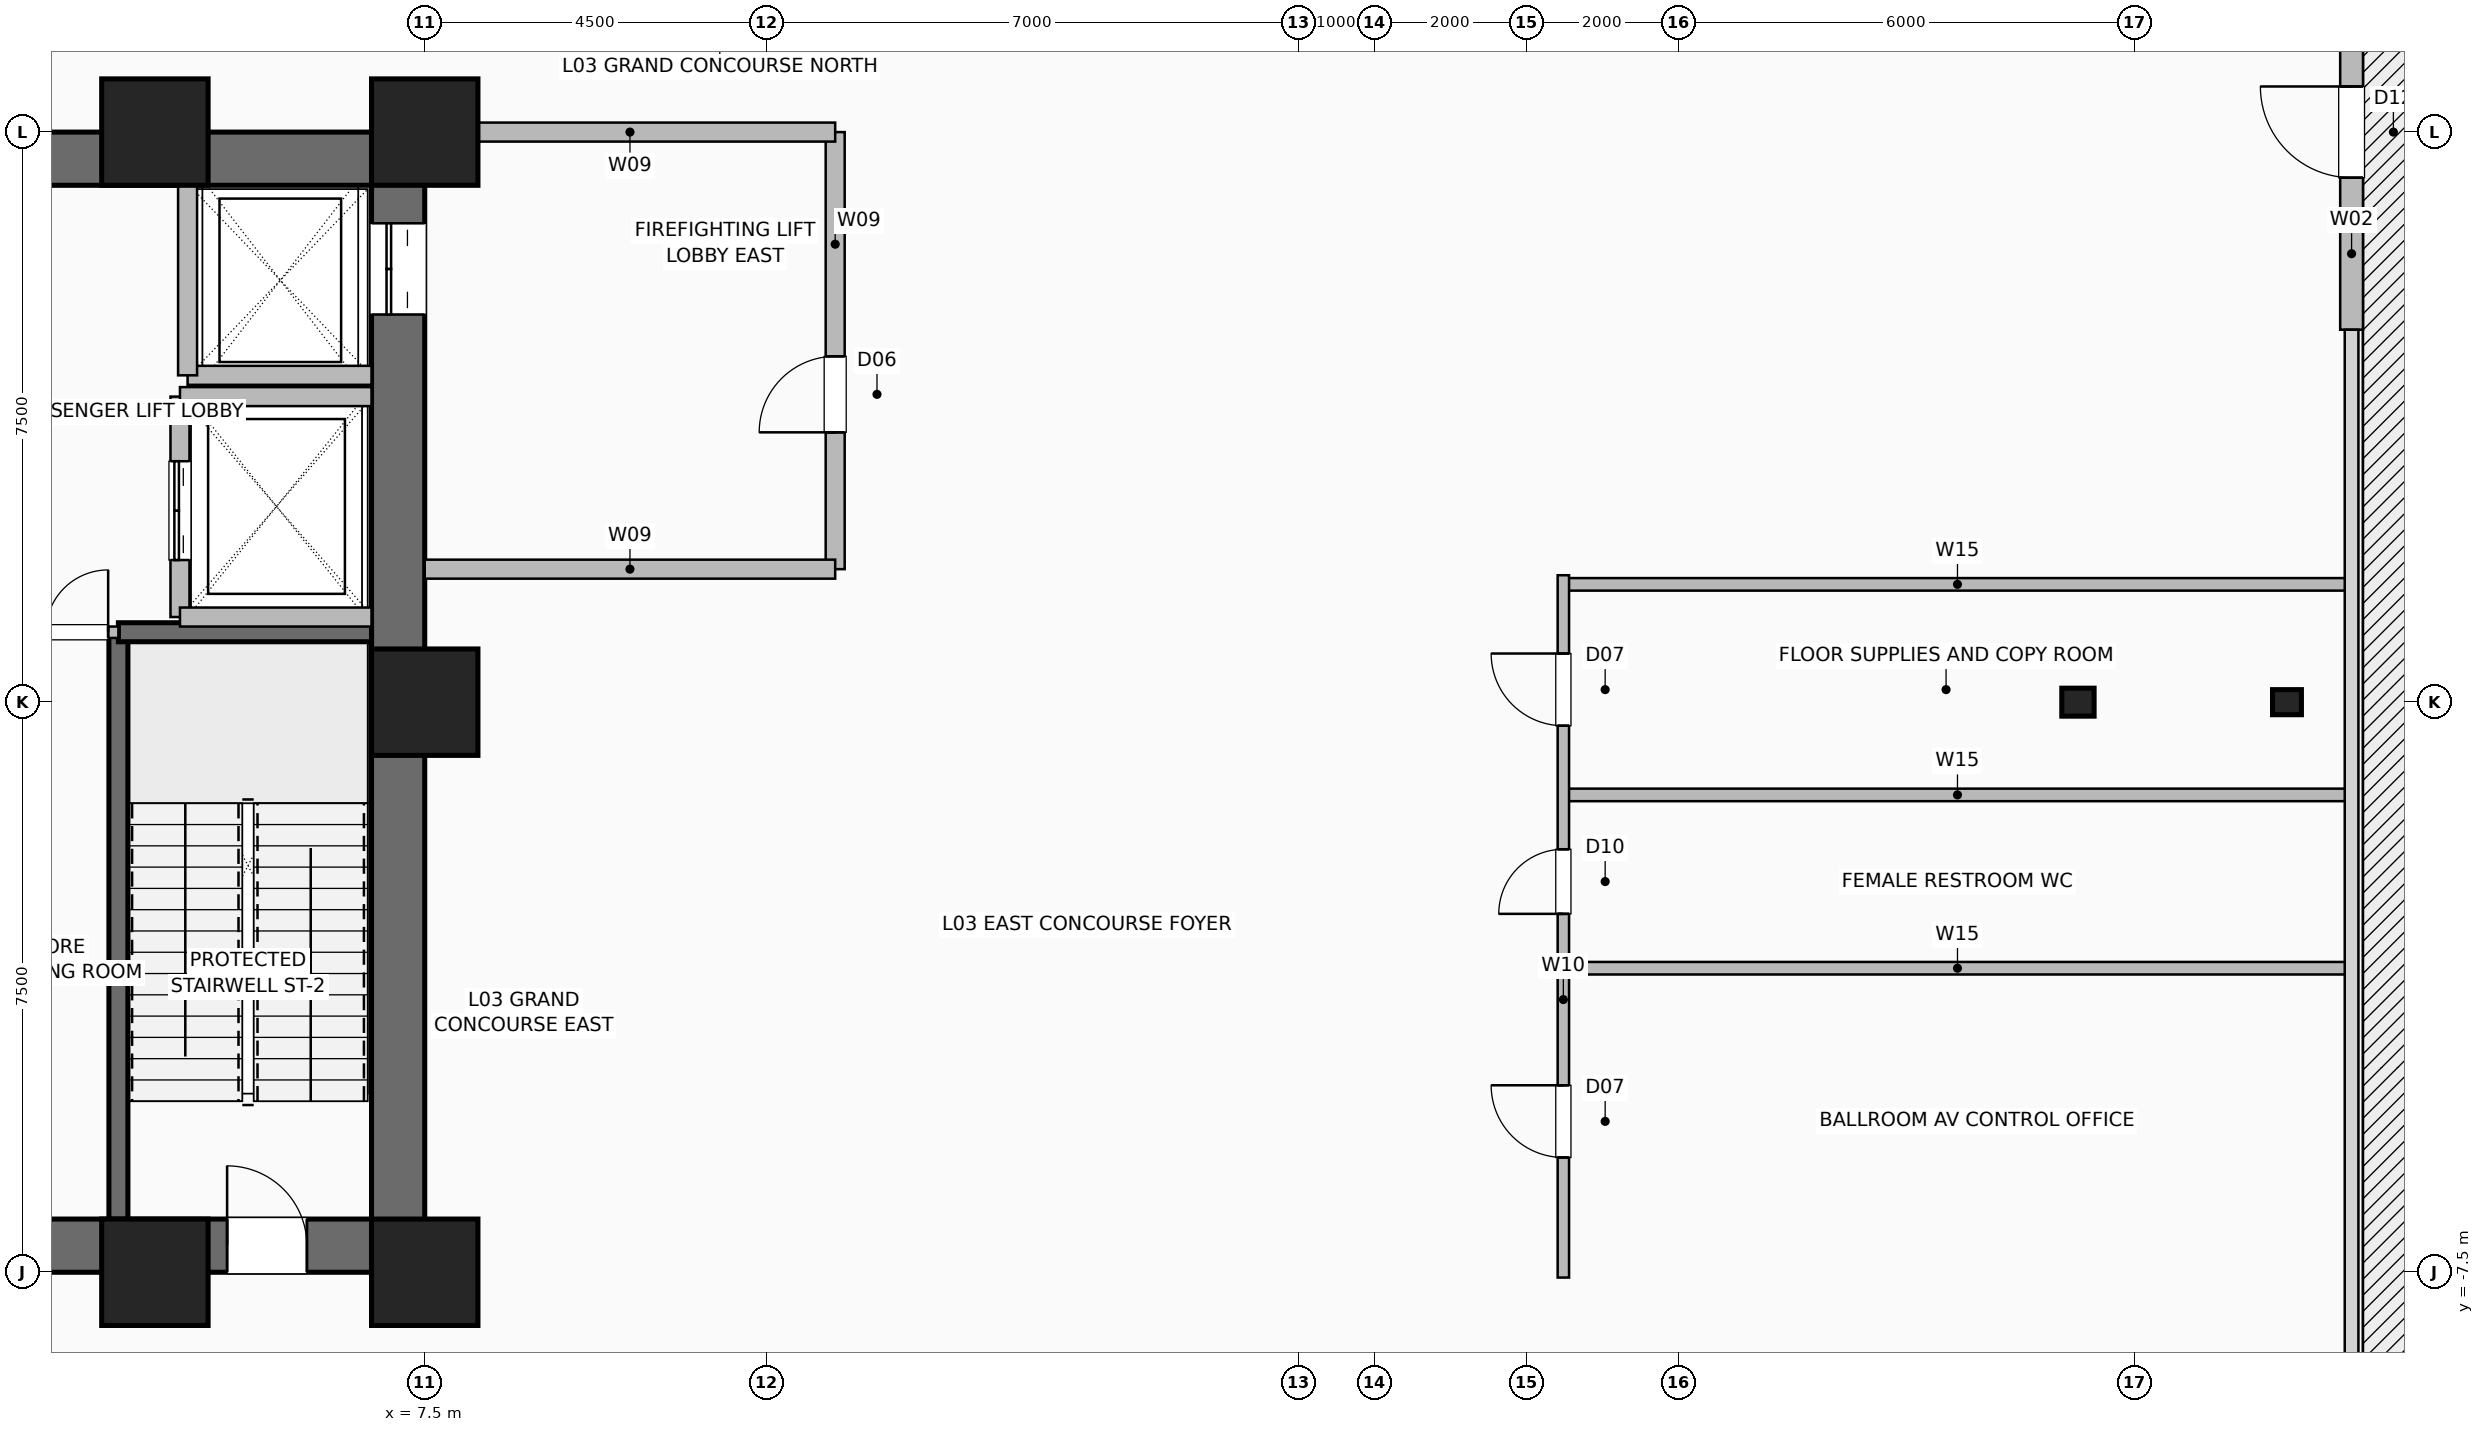
"""IFC4 building model, lengths in metres.
Left out: names, types, materials, properties, quantities, classifications, styles, units other than length and angle.
Written with IfcOpenShell. Run it as: python <this file> out.ifc"""

import sys

from ifc_helpers import new_model, si_unit, direction, frame, frame_2d, origin, origin_2d, place, context, subcontext, project, spatial, rectangle, hollow_rectangle, i_section, extrude, element, fill, save


model = new_model("IFC4")
c1 = context("Model", 3, precision=1e-05, world=origin(), true_north=direction((0.0, 1.0)))
c2 = subcontext(c1, "Body", "Model", "MODEL_VIEW")
j1 = project(units=[si_unit("LENGTHUNIT", "METRE"), si_unit("PLANEANGLEUNIT", "RADIAN")], contexts=[c1])
p1 = place(None, origin())
s1 = spatial("IfcSite", under=j1, at=p1, CompositionType="ELEMENT")
p2 = place(p1, origin())
s2 = spatial("IfcBuilding", under=s1, at=p2, CompositionType="ELEMENT")
p3 = place(p2, frame((0.0, 0.0, 16.2)))
s3 = spatial("IfcBuildingStorey", under=s2, at=p3, CompositionType="ELEMENT", Elevation=16.2)
for number, where, z_axis, x_axis in (
    (1, (3.95, -7.5, 0.0), (0.0, 0.0, 1.0), (1.0, 0.0, 0.0)),
    (2, (7.5, -7.5, 0.0), (0.0, 0.0, 1.0), (1.0, 0.0, 0.0)),
    (3, (7.5, 0.0, 0.0), (0.0, 0.0, 1.0), (1.0, 0.0, 0.0)),
    (4, (7.5, 7.5, 0.0), (0.0, 0.0, 1.0), (1.0, 0.0, 0.0)),
    (5, (3.95, 7.5, 0.0), (0.0, 0.0, 1.0), (1.0, 0.0, 0.0)),
):
    element("IfcColumn", number, at=place(p3, frame(where, z_axis=z_axis, x_axis=x_axis)), inside=s3, PredefinedType="COLUMN", context=c2, shape_type="SweptSolid", body=[
        extrude(hollow_rectangle(XDim=1.4, YDim=1.4, WallThickness=0.06, at=origin_2d()), origin(), (0.0, 0.0, 1.0), 5.4),
    ])
p4 = place(p3, frame((29.25, 0.0, 0.0), z_axis=(0.0, 0.0, 1.0), x_axis=(1.0, 0.0, 0.0)))
e6 = element("IfcColumn", 6, at=p4, inside=s3, PredefinedType="COLUMN", context=c2, shape_type="SweptSolid", body=[
    extrude(i_section(OverallWidth=0.368, OverallDepth=0.425, WebThickness=0.03, FlangeThickness=0.048, FilletRadius=0.02, at=origin_2d()), origin(), (0.0, 0.0, 1.0), 5.4),
])
p5 = place(p3, frame((32.0, 0.0, -0.4), z_axis=(0.0, 0.0, 1.0), x_axis=(1.0, 0.0, 0.0)))
e7 = element("IfcColumn", 7, at=p5, inside=s3, PredefinedType="COLUMN", context=c2, shape_type="SweptSolid", body=[
    extrude(i_section(OverallWidth=0.33, OverallDepth=0.38, WebThickness=0.017, FlangeThickness=0.028, FilletRadius=0.02, at=origin_2d()), origin(), (0.0, 0.0, 1.0), 5.4),
])
p6 = place(p3, frame((32.85, 4.9, 0.0), z_axis=(0.0, 0.0, 1.0), x_axis=(0.0, 1.0, 0.0)))
e8 = element("IfcWall", 8, at=p6, inside=s3, PredefinedType="SOLIDWALL", context=c2, shape_type="SweptSolid", body=[
    extrude(rectangle(XDim=5.2, YDim=0.3, at=frame_2d((2.6, 0.0))), origin(), (0.0, 0.0, 1.0), 5.0),
])
p7 = place(p6, frame((2.0, 0.0, 0.0)))
e9 = element("IfcOpeningElement", 9, at=p7, cuts=e8, PredefinedType="OPENING", context=c2, shape_type="SweptSolid", body=[
    extrude(rectangle(XDim=1.2, YDim=2.25, at=frame_2d((0.6, 1.125))), frame((0.0, 0.16, 0.0), z_axis=(0.0, -1.0, 0.0), x_axis=(1.0, 0.0, 0.0)), (0.0, 0.0, 1.0), 0.32),
])
p8 = place(p3, frame((-7.5, -7.15, 0.0), z_axis=(0.0, 0.0, 1.0), x_axis=(1.0, 0.0, 0.0)))
e10 = element("IfcWall", 10, at=p8, inside=s3, PredefinedType="SHEAR", context=c2, shape_type="SweptSolid", body=[
    extrude(rectangle(XDim=15.0, YDim=0.7, at=frame_2d((7.5, 0.0))), origin(), (0.0, 0.0, 1.0), 5.0),
])
p9 = place(p8, frame((1.55, 0.0, 0.0)))
e11 = element("IfcOpeningElement", 11, at=p9, cuts=e10, PredefinedType="OPENING", context=c2, shape_type="SweptSolid", body=[
    extrude(rectangle(XDim=1.05, YDim=2.08, at=frame_2d((0.525, 1.04))), frame((0.0, 0.36, 0.0), z_axis=(0.0, -1.0, 0.0), x_axis=(1.0, 0.0, 0.0)), (0.0, 0.0, 1.0), 0.72),
])
p10 = place(p8, frame((12.4, 0.0, 0.0)))
e12 = element("IfcOpeningElement", 12, at=p10, cuts=e10, PredefinedType="OPENING", context=c2, shape_type="SweptSolid", body=[
    extrude(rectangle(XDim=1.05, YDim=2.08, at=frame_2d((0.525, 1.04))), frame((0.0, 0.36, 0.0), z_axis=(0.0, -1.0, 0.0), x_axis=(1.0, 0.0, 0.0)), (0.0, 0.0, 1.0), 0.72),
])
p11 = place(p8, frame((4.64, 0.0, 0.0)))
e13 = element("IfcOpeningElement", 13, at=p11, cuts=e10, PredefinedType="OPENING", context=c2, shape_type="SweptSolid", body=[
    extrude(rectangle(XDim=1.1, YDim=2.2, at=frame_2d((0.55, 1.1))), frame((0.0, 0.36, 0.0), z_axis=(0.0, -1.0, 0.0), x_axis=(1.0, 0.0, 0.0)), (0.0, 0.0, 1.0), 0.72),
])
p12 = place(p8, frame((6.52, 0.0, 0.0)))
e14 = element("IfcOpeningElement", 14, at=p12, cuts=e10, PredefinedType="OPENING", context=c2, shape_type="SweptSolid", body=[
    extrude(rectangle(XDim=1.1, YDim=2.2, at=frame_2d((0.55, 1.1))), frame((0.0, 0.36, 0.0), z_axis=(0.0, -1.0, 0.0), x_axis=(1.0, 0.0, 0.0)), (0.0, 0.0, 1.0), 0.72),
])
p13 = place(p8, frame((8.4, 0.0, 0.0)))
e15 = element("IfcOpeningElement", 15, at=p13, cuts=e10, PredefinedType="OPENING", context=c2, shape_type="SweptSolid", body=[
    extrude(rectangle(XDim=1.1, YDim=2.2, at=frame_2d((0.55, 1.1))), frame((0.0, 0.36, 0.0), z_axis=(0.0, -1.0, 0.0), x_axis=(1.0, 0.0, 0.0)), (0.0, 0.0, 1.0), 0.72),
])
p14 = place(p3, frame((-7.5, 7.15, 0.0), z_axis=(0.0, 0.0, 1.0), x_axis=(1.0, 0.0, 0.0)))
e16 = element("IfcWall", 16, at=p14, inside=s3, PredefinedType="SHEAR", context=c2, shape_type="SweptSolid", body=[
    extrude(rectangle(XDim=15.0, YDim=0.7, at=frame_2d((7.5, 0.0))), origin(), (0.0, 0.0, 1.0), 5.0),
])
p15 = place(p3, frame((7.15, -7.5, 0.0), z_axis=(0.0, 0.0, 1.0), x_axis=(0.0, 1.0, 0.0)))
e17 = element("IfcWall", 17, at=p15, inside=s3, PredefinedType="SHEAR", context=c2, shape_type="SweptSolid", body=[
    extrude(rectangle(XDim=15.0, YDim=0.7, at=frame_2d((7.5, 0.0))), origin(), (0.0, 0.0, 1.0), 5.0),
])
p16 = place(p15, frame((12.6, 0.0, 0.0)))
e18 = element("IfcOpeningElement", 18, at=p16, cuts=e17, PredefinedType="OPENING", context=c2, shape_type="SweptSolid", body=[
    extrude(rectangle(XDim=1.2, YDim=2.2, at=frame_2d((0.6, 1.1))), frame((0.0, 0.36, 0.0), z_axis=(0.0, -1.0, 0.0), x_axis=(1.0, 0.0, 0.0)), (0.0, 0.0, 1.0), 0.72),
])
p17 = place(p3, frame((3.47, -6.8, 0.0), z_axis=(0.0, 0.0, 1.0), x_axis=(0.0, 1.0, 0.0)))
e19 = element("IfcWall", 19, at=p17, inside=s3, PredefinedType="SHEAR", context=c2, shape_type="SweptSolid", body=[
    extrude(rectangle(XDim=7.72, YDim=0.25, at=frame_2d((3.86, 0.0))), origin(), (0.0, 0.0, 1.0), 5.0),
])
p18 = place(p3, frame((3.47, 0.92, 0.0), z_axis=(0.0, 0.0, 1.0), x_axis=(1.0, 0.0, 0.0)))
e20 = element("IfcWall", 20, at=p18, inside=s3, PredefinedType="SHEAR", context=c2, shape_type="SweptSolid", body=[
    extrude(rectangle(XDim=3.33, YDim=0.25, at=frame_2d((1.665, 0.0))), origin(), (0.0, 0.0, 1.0), 5.0),
])
p19 = place(p3, frame((4.38, 4.3, 0.0), z_axis=(0.0, 0.0, 1.0), x_axis=(1.0, 0.0, 0.0)))
e21 = element("IfcWall", 21, at=p19, inside=s3, PredefinedType="SHEAR", context=c2, shape_type="SweptSolid", body=[
    extrude(rectangle(XDim=2.42, YDim=0.25, at=frame_2d((1.21, 0.0))), origin(), (0.0, 0.0, 1.0), 5.0),
])
p20 = place(p3, frame((4.38, 4.3, 0.0), z_axis=(0.0, 0.0, 1.0), x_axis=(0.0, 1.0, 0.0)))
e22 = element("IfcWall", 22, at=p20, inside=s3, PredefinedType="SHEAR", context=c2, shape_type="SweptSolid", body=[
    extrude(rectangle(XDim=2.5, YDim=0.25, at=frame_2d((1.25, 0.0))), origin(), (0.0, 0.0, 1.0), 5.0),
])
p21 = place(p3, frame((4.28, 1.12, 0.0), z_axis=(0.0, 0.0, 1.0), x_axis=(0.0, 1.0, 0.0)))
e23 = element("IfcWall", 23, at=p21, inside=s3, PredefinedType="SHEAR", context=c2, shape_type="SweptSolid", body=[
    extrude(rectangle(XDim=2.9, YDim=0.25, at=frame_2d((1.45, 0.0))), origin(), (0.0, 0.0, 1.0), 5.0),
])
p22 = place(p21, frame((0.75, 0.0, 0.0)))
e24 = element("IfcOpeningElement", 24, at=p22, cuts=e23, PredefinedType="OPENING", context=c2, shape_type="SweptSolid", body=[
    extrude(rectangle(XDim=1.3, YDim=2.3, at=frame_2d((0.65, 1.15))), frame((0.0, 0.135, 0.0), z_axis=(0.0, -1.0, 0.0), x_axis=(1.0, 0.0, 0.0)), (0.0, 0.0, 1.0), 0.27),
])
for number, where, z_axis, x_axis in (
    (25, (4.28, 1.12, 0.0), (0.0, 0.0, 1.0), (1.0, 0.0, 0.0)),
    (26, (4.28, 4.02, 0.0), (0.0, 0.0, 1.0), (1.0, 0.0, 0.0)),
):
    element("IfcWall", number, at=place(p3, frame(where, z_axis=z_axis, x_axis=x_axis)), inside=s3, PredefinedType="SHEAR", context=c2, shape_type="SweptSolid", body=[
        extrude(rectangle(XDim=2.52, YDim=0.25, at=frame_2d((1.26, 0.0))), origin(), (0.0, 0.0, 1.0), 5.0),
    ])
p23 = place(p3, frame((2.38, 0.92, 0.0), z_axis=(0.0, 0.0, 1.0), x_axis=(1.0, 0.0, 0.0)))
e27 = element("IfcWall", 27, at=p23, inside=s3, PredefinedType="PARTITIONING", context=c2, shape_type="SweptSolid", body=[
    extrude(rectangle(XDim=1.09, YDim=0.15, at=frame_2d((0.545, 0.0))), origin(), (0.0, 0.0, 1.0), 5.0),
])
p24 = place(p23, frame((0.135, 0.0, 0.0)))
e28 = element("IfcOpeningElement", 28, at=p24, cuts=e27, PredefinedType="OPENING", context=c2, shape_type="SweptSolid", body=[
    extrude(rectangle(XDim=0.82, YDim=2.05, at=frame_2d((0.41, 1.025))), frame((0.0, 0.085, 0.0), z_axis=(0.0, -1.0, 0.0), x_axis=(1.0, 0.0, 0.0)), (0.0, 0.0, 1.0), 0.17),
])
p25 = place(p3, frame((12.9, 1.75, 0.0), z_axis=(0.0, 0.0, 1.0), x_axis=(0.0, 1.0, 0.0)))
e29 = element("IfcWall", 29, at=p25, inside=s3, PredefinedType="SHEAR", context=c2, shape_type="SweptSolid", body=[
    extrude(rectangle(XDim=5.75, YDim=0.25, at=frame_2d((2.875, 0.0))), origin(), (0.0, 0.0, 1.0), 5.0),
])
p26 = place(p25, frame((1.8, 0.0, 0.0)))
e30 = element("IfcOpeningElement", 30, at=p26, cuts=e29, PredefinedType="OPENING", context=c2, shape_type="SweptSolid", body=[
    extrude(rectangle(XDim=1.0, YDim=2.08, at=frame_2d((0.5, 1.04))), frame((0.0, 0.135, 0.0), z_axis=(0.0, -1.0, 0.0), x_axis=(1.0, 0.0, 0.0)), (0.0, 0.0, 1.0), 0.27),
])
for number, where, z_axis, x_axis in (
    (31, (7.5, 1.75, 0.0), (0.0, 0.0, 1.0), (1.0, 0.0, 0.0)),
    (32, (7.5, 7.5, 0.0), (0.0, 0.0, 1.0), (1.0, 0.0, 0.0)),
):
    element("IfcWall", number, at=place(p3, frame(where, z_axis=z_axis, x_axis=x_axis)), inside=s3, PredefinedType="SHEAR", context=c2, shape_type="SweptSolid", body=[
        extrude(rectangle(XDim=5.4, YDim=0.25, at=frame_2d((2.7, 0.0))), origin(), (0.0, 0.0, 1.0), 5.0),
    ])
for number, where, z_axis, x_axis in (
    (33, (22.48, -1.22, 0.0), (0.0, 0.0, 1.0), (1.0, 0.0, 0.0)),
    (34, (22.48, -3.5, 0.0), (0.0, 0.0, 1.0), (1.0, 0.0, 0.0)),
    (35, (22.48, 1.55, 0.0), (0.0, 0.0, 1.0), (1.0, 0.0, 0.0)),
):
    element("IfcWall", number, at=place(p3, frame(where, z_axis=z_axis, x_axis=x_axis)), inside=s3, PredefinedType="PLUMBINGWALL", context=c2, shape_type="SweptSolid", body=[
        extrude(rectangle(XDim=10.37, YDim=0.165, at=frame_2d((5.185, 0.0))), origin(), (0.0, 0.0, 1.0), 5.0),
    ])
p27 = place(p3, frame((22.48, -7.57, 0.0), z_axis=(0.0, 0.0, 1.0), x_axis=(0.0, 1.0, 0.0)))
e36 = element("IfcWall", 36, at=p27, inside=s3, PredefinedType="PARTITIONING", context=c2, shape_type="SweptSolid", body=[
    extrude(rectangle(XDim=9.24, YDim=0.15, at=frame_2d((4.62, 0.0))), origin(), (0.0, 0.0, 1.0), 5.0),
])
p28 = place(p27, frame((1.58, 0.0, 0.0)))
e37 = element("IfcOpeningElement", 37, at=p28, cuts=e36, PredefinedType="OPENING", context=c2, shape_type="SweptSolid", body=[
    extrude(rectangle(XDim=0.95, YDim=2.06, at=frame_2d((0.475, 1.03))), frame((0.0, 0.085, 0.0), z_axis=(0.0, -1.0, 0.0), x_axis=(1.0, 0.0, 0.0)), (0.0, 0.0, 1.0), 0.17),
])
p29 = place(p27, frame((4.785, 0.0, 0.0)))
e38 = element("IfcOpeningElement", 38, at=p29, cuts=e36, PredefinedType="OPENING", context=c2, shape_type="SweptSolid", body=[
    extrude(rectangle(XDim=0.85, YDim=2.05, at=frame_2d((0.425, 1.025))), frame((0.0, 0.085, 0.0), z_axis=(0.0, -1.0, 0.0), x_axis=(1.0, 0.0, 0.0)), (0.0, 0.0, 1.0), 0.17),
])
p30 = place(p27, frame((7.26, 0.0, 0.0)))
e39 = element("IfcOpeningElement", 39, at=p30, cuts=e36, PredefinedType="OPENING", context=c2, shape_type="SweptSolid", body=[
    extrude(rectangle(XDim=0.95, YDim=2.06, at=frame_2d((0.475, 1.03))), frame((0.0, 0.085, 0.0), z_axis=(0.0, -1.0, 0.0), x_axis=(1.0, 0.0, 0.0)), (0.0, 0.0, 1.0), 0.17),
])
p31 = place(p7, origin())
e40 = element("IfcDoor", 40, at=p31, inside=s3, OperationType="SINGLE_SWING_RIGHT", PredefinedType="DOOR", context=c2, shape_type="SweptSolid", body=[
    extrude(rectangle(XDim=1.2, YDim=2.25, at=frame_2d((0.6, 1.125))), frame((0.0, 0.025, 0.0), z_axis=(0.0, -1.0, 0.0), x_axis=(1.0, 0.0, 0.0)), (0.0, 0.0, 1.0), 0.05),
])
fill(e9, e40)
p32 = place(p10, origin())
e41 = element("IfcDoor", 41, at=p32, inside=s3, OperationType="SINGLE_SWING_LEFT", PredefinedType="DOOR", context=c2, shape_type="SweptSolid", body=[
    extrude(rectangle(XDim=1.05, YDim=2.08, at=frame_2d((0.525, 1.04))), frame((0.0, 0.025, 0.0), z_axis=(0.0, -1.0, 0.0), x_axis=(1.0, 0.0, 0.0)), (0.0, 0.0, 1.0), 0.05),
])
fill(e12, e41)
p33 = place(p16, origin())
e42 = element("IfcDoor", 42, at=p33, inside=s3, OperationType="DOUBLE_DOOR_SLIDING", PredefinedType="DOOR", context=c2, shape_type="SweptSolid", body=[
    extrude(rectangle(XDim=1.2, YDim=2.2, at=frame_2d((0.6, 1.1))), frame((0.0, 0.025, 0.0), z_axis=(0.0, -1.0, 0.0), x_axis=(1.0, 0.0, 0.0)), (0.0, 0.0, 1.0), 0.05),
])
fill(e18, e42)
p34 = place(p22, origin())
e43 = element("IfcDoor", 43, at=p34, inside=s3, OperationType="DOUBLE_DOOR_SLIDING", PredefinedType="DOOR", context=c2, shape_type="SweptSolid", body=[
    extrude(rectangle(XDim=1.3, YDim=2.3, at=frame_2d((0.65, 1.15))), frame((0.0, 0.025, 0.0), z_axis=(0.0, -1.0, 0.0), x_axis=(1.0, 0.0, 0.0)), (0.0, 0.0, 1.0), 0.05),
])
fill(e24, e43)
p35 = place(p24, origin())
e44 = element("IfcDoor", 44, at=p35, inside=s3, OperationType="SINGLE_SWING_RIGHT", PredefinedType="DOOR", context=c2, shape_type="SweptSolid", body=[
    extrude(rectangle(XDim=0.82, YDim=2.05, at=frame_2d((0.41, 1.025))), frame((0.0, 0.025, 0.0), z_axis=(0.0, -1.0, 0.0), x_axis=(1.0, 0.0, 0.0)), (0.0, 0.0, 1.0), 0.05),
])
fill(e28, e44)
p36 = place(p26, origin())
e45 = element("IfcDoor", 45, at=p36, inside=s3, OperationType="SINGLE_SWING_LEFT", PredefinedType="DOOR", context=c2, shape_type="SweptSolid", body=[
    extrude(rectangle(XDim=1.0, YDim=2.08, at=frame_2d((0.5, 1.04))), frame((0.0, 0.025, 0.0), z_axis=(0.0, -1.0, 0.0), x_axis=(1.0, 0.0, 0.0)), (0.0, 0.0, 1.0), 0.05),
])
fill(e30, e45)
p37 = place(p28, origin())
e46 = element("IfcDoor", 46, at=p37, inside=s3, OperationType="SINGLE_SWING_RIGHT", PredefinedType="DOOR", context=c2, shape_type="SweptSolid", body=[
    extrude(rectangle(XDim=0.95, YDim=2.06, at=frame_2d((0.475, 1.03))), frame((0.0, 0.025, 0.0), z_axis=(0.0, -1.0, 0.0), x_axis=(1.0, 0.0, 0.0)), (0.0, 0.0, 1.0), 0.05),
])
fill(e37, e46)
p38 = place(p29, origin())
e47 = element("IfcDoor", 47, at=p38, inside=s3, OperationType="SINGLE_SWING_LEFT", PredefinedType="DOOR", context=c2, shape_type="SweptSolid", body=[
    extrude(rectangle(XDim=0.85, YDim=2.05, at=frame_2d((0.425, 1.025))), frame((0.0, 0.025, 0.0), z_axis=(0.0, -1.0, 0.0), x_axis=(1.0, 0.0, 0.0)), (0.0, 0.0, 1.0), 0.05),
])
fill(e38, e47)
p39 = place(p30, origin())
e48 = element("IfcDoor", 48, at=p39, inside=s3, OperationType="SINGLE_SWING_RIGHT", PredefinedType="DOOR", context=c2, shape_type="SweptSolid", body=[
    extrude(rectangle(XDim=0.95, YDim=2.06, at=frame_2d((0.475, 1.03))), frame((0.0, 0.025, 0.0), z_axis=(0.0, -1.0, 0.0), x_axis=(1.0, 0.0, 0.0)), (0.0, 0.0, 1.0), 0.05),
])
fill(e39, e48)
save(model, sys.argv[1])
